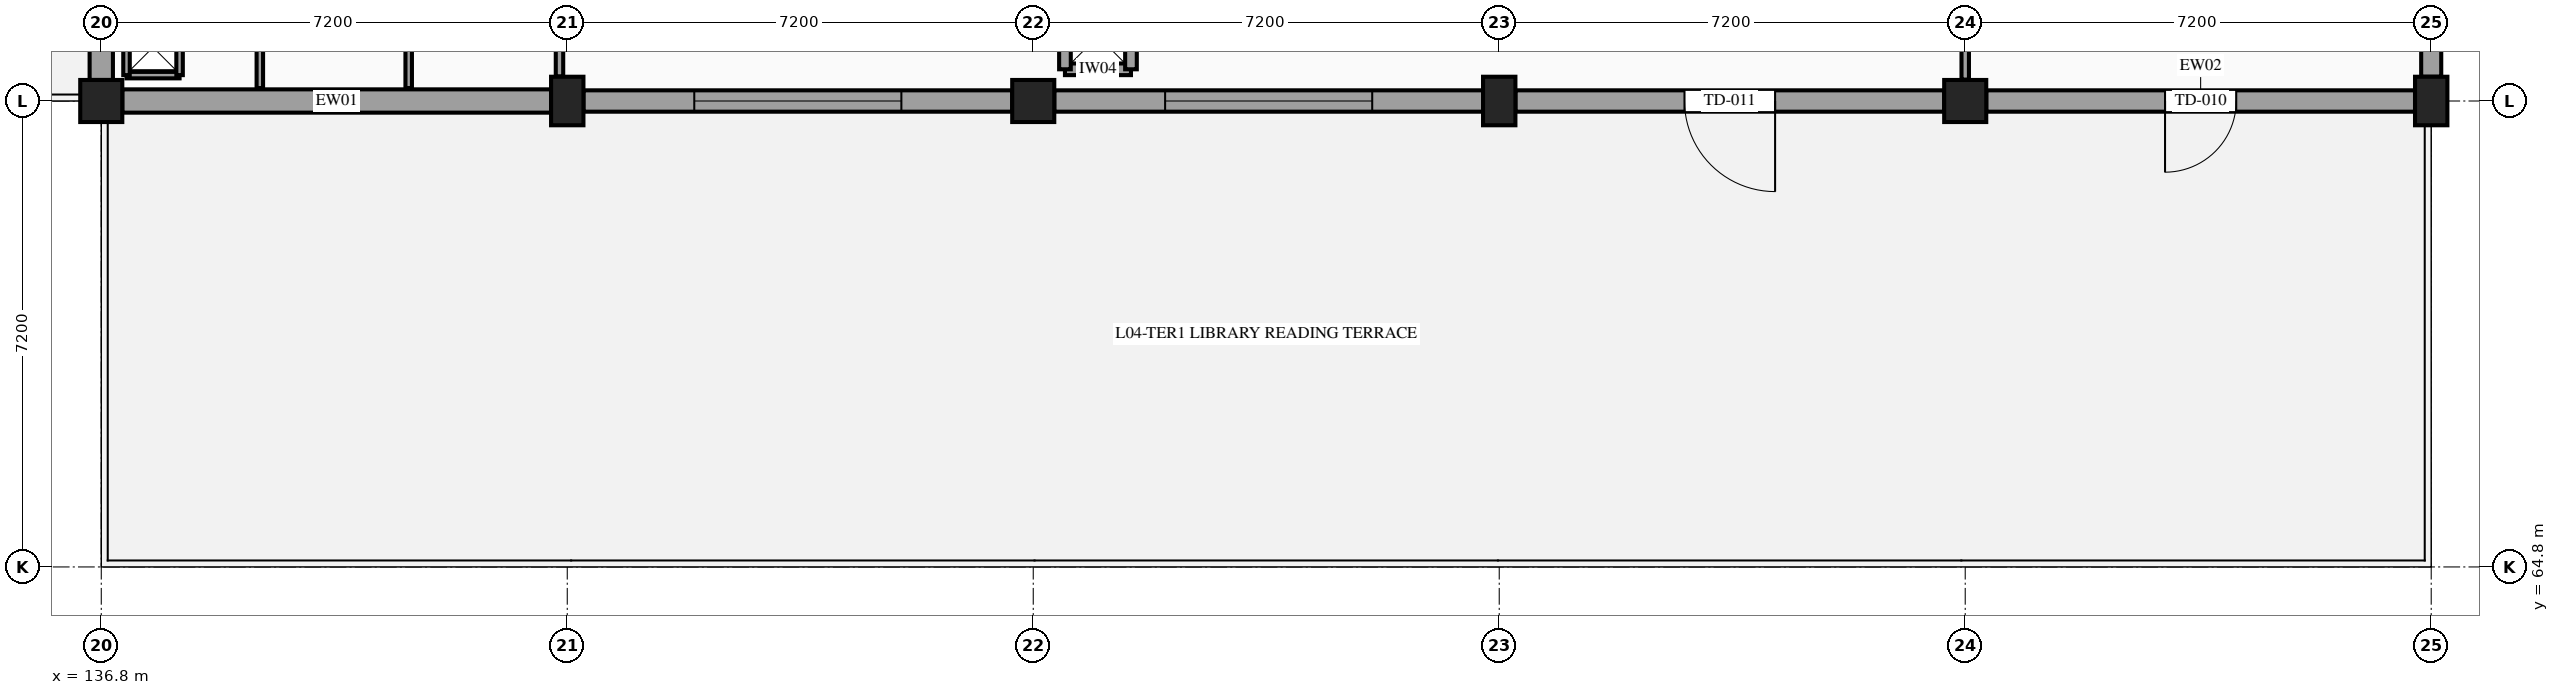
"""IFC4 building model, lengths in metres.
Left out: names, types, materials, properties, quantities, classifications, styles, units other than length and angle.
Written with IfcOpenShell. Run it as: python <this file> out.ifc"""

import sys

from ifc_helpers import new_model, si_unit, direction, frame, frame_2d, origin, origin_2d, place, context, subcontext, project, spatial, rectangle, extrude, element, fill, save


model = new_model("IFC4")
c1 = context("Model", 3, precision=1e-05, world=origin(), true_north=direction((0.0, 1.0)))
c2 = subcontext(c1, "Body", "Model", "MODEL_VIEW")
j1 = project(units=[si_unit("LENGTHUNIT", "METRE"), si_unit("PLANEANGLEUNIT", "RADIAN")], contexts=[c1])
p1 = place(None, origin())
s1 = spatial("IfcSite", under=j1, at=p1, CompositionType="ELEMENT")
p2 = place(p1, origin())
s2 = spatial("IfcBuilding", under=s1, at=p2, CompositionType="ELEMENT")
p3 = place(p2, frame((0.0, 0.0, 18.6)))
s3 = spatial("IfcBuildingStorey", under=s2, at=p3, CompositionType="ELEMENT", Elevation=18.6)
p4 = place(p3, frame((136.8, 72.0, 0.0), z_axis=(0.0, 0.0, 1.0), x_axis=(1.0, 0.0, 0.0)))
e1 = element("IfcColumn", 1, at=p4, inside=s3, PredefinedType="COLUMN", context=c2, shape_type="SweptSolid", body=[
    extrude(rectangle(XDim=0.65, YDim=0.65, at=origin_2d()), origin(), (0.0, 0.0, 1.0), 4.2),
])
p5 = place(p3, frame((144.0, 72.0, 0.0), z_axis=(0.0, 0.0, 1.0), x_axis=(1.0, 0.0, 0.0)))
e2 = element("IfcColumn", 2, at=p5, inside=s3, PredefinedType="COLUMN", context=c2, shape_type="SweptSolid", body=[
    extrude(rectangle(XDim=0.5, YDim=0.75, at=origin_2d()), origin(), (0.0, 0.0, 1.0), 4.2),
])
p6 = place(p3, frame((151.2, 72.0, 0.0), z_axis=(0.0, 0.0, 1.0), x_axis=(1.0, 0.0, 0.0)))
e3 = element("IfcColumn", 3, at=p6, inside=s3, PredefinedType="COLUMN", context=c2, shape_type="SweptSolid", body=[
    extrude(rectangle(XDim=0.65, YDim=0.65, at=origin_2d()), origin(), (0.0, 0.0, 1.0), 4.2),
])
p7 = place(p3, frame((158.4, 72.0, 0.0), z_axis=(0.0, 0.0, 1.0), x_axis=(1.0, 0.0, 0.0)))
e4 = element("IfcColumn", 4, at=p7, inside=s3, PredefinedType="COLUMN", context=c2, shape_type="SweptSolid", body=[
    extrude(rectangle(XDim=0.5, YDim=0.75, at=origin_2d()), origin(), (0.0, 0.0, 1.0), 4.2),
])
p8 = place(p3, frame((165.6, 72.0, 0.0), z_axis=(0.0, 0.0, 1.0), x_axis=(1.0, 0.0, 0.0)))
e5 = element("IfcColumn", 5, at=p8, inside=s3, PredefinedType="COLUMN", context=c2, shape_type="SweptSolid", body=[
    extrude(rectangle(XDim=0.65, YDim=0.65, at=origin_2d()), origin(), (0.0, 0.0, 1.0), 4.2),
])
p9 = place(p3, frame((172.8, 72.0, 0.0), z_axis=(0.0, 0.0, 1.0), x_axis=(1.0, 0.0, 0.0)))
e6 = element("IfcColumn", 6, at=p9, inside=s3, PredefinedType="COLUMN", context=c2, shape_type="SweptSolid", body=[
    extrude(rectangle(XDim=0.5, YDim=0.75, at=origin_2d()), origin(), (0.0, 0.0, 1.0), 4.2),
])
p10 = place(p3, frame((172.8, 78.88, 0.0), z_axis=(0.0, 0.0, 1.0), x_axis=(0.0, -1.0, 0.0)))
e7 = element("IfcWall", 7, at=p10, inside=s3, PredefinedType="STANDARD", context=c2, shape_type="SweptSolid", body=[
    extrude(rectangle(XDim=6.505, YDim=0.31, at=frame_2d((3.252, 0.0))), origin(), (0.0, 0.0, 1.0), 3.16),
])
p11 = place(p10, frame((2.002, 0.0, 0.98)))
e8 = element("IfcOpeningElement", 8, at=p11, cuts=e7, PredefinedType="OPENING", context=c2, shape_type="SweptSolid", body=[
    extrude(rectangle(XDim=2.5, YDim=1.35, at=frame_2d((1.25, 0.675))), frame((0.0, 0.165, 0.0), z_axis=(0.0, -1.0, 0.0), x_axis=(1.0, 0.0, 0.0)), (0.0, 0.0, 1.0), 0.33),
])
p12 = place(p3, frame((172.55, 72.0, 0.0), z_axis=(0.0, 0.0, 1.0), x_axis=(-1.0, 0.0, 0.0)))
e9 = element("IfcWall", 9, at=p12, inside=s3, PredefinedType="STANDARD", context=c2, shape_type="SweptSolid", body=[
    extrude(rectangle(XDim=6.625, YDim=0.33, at=frame_2d((3.312, 0.0))), origin(), (0.0, 0.0, 1.0), 3.21),
])
p13 = place(p12, frame((2.762, 0.0, 0.0)))
e10 = element("IfcOpeningElement", 10, at=p13, cuts=e9, PredefinedType="OPENING", context=c2, shape_type="SweptSolid", body=[
    extrude(rectangle(XDim=1.1, YDim=2.2, at=frame_2d((0.55, 1.1))), frame((0.0, 0.175, 0.0), z_axis=(0.0, -1.0, 0.0), x_axis=(1.0, 0.0, 0.0)), (0.0, 0.0, 1.0), 0.35),
])
p14 = place(p3, frame((165.275, 72.0, 0.0), z_axis=(0.0, 0.0, 1.0), x_axis=(-1.0, 0.0, 0.0)))
e11 = element("IfcWall", 11, at=p14, inside=s3, PredefinedType="STANDARD", context=c2, shape_type="SweptSolid", body=[
    extrude(rectangle(XDim=6.625, YDim=0.33, at=frame_2d((3.312, 0.0))), origin(), (0.0, 0.0, 1.0), 3.21),
])
p15 = place(p14, frame((2.613, 0.0, 0.0)))
e12 = element("IfcOpeningElement", 12, at=p15, cuts=e11, PredefinedType="OPENING", context=c2, shape_type="SweptSolid", body=[
    extrude(rectangle(XDim=1.4, YDim=2.25, at=frame_2d((0.7, 1.125))), frame((0.0, 0.175, 0.0), z_axis=(0.0, -1.0, 0.0), x_axis=(1.0, 0.0, 0.0)), (0.0, 0.0, 1.0), 0.35),
])
p16 = place(p3, frame((158.15, 72.0, 0.0), z_axis=(0.0, 0.0, 1.0), x_axis=(-1.0, 0.0, 0.0)))
e13 = element("IfcWall", 13, at=p16, inside=s3, PredefinedType="STANDARD", context=c2, shape_type="SweptSolid", body=[
    extrude(rectangle(XDim=6.625, YDim=0.33, at=frame_2d((3.312, 0.0))), origin(), (0.0, 0.0, 1.0), 3.21),
])
p17 = place(p16, frame((1.712, 0.0, 0.95)))
e14 = element("IfcOpeningElement", 14, at=p17, cuts=e13, PredefinedType="OPENING", context=c2, shape_type="SweptSolid", body=[
    extrude(rectangle(XDim=3.2, YDim=1.45, at=frame_2d((1.6, 0.725))), frame((0.0, 0.175, 0.0), z_axis=(0.0, -1.0, 0.0), x_axis=(1.0, 0.0, 0.0)), (0.0, 0.0, 1.0), 0.35),
])
p18 = place(p3, frame((150.875, 72.0, 0.0), z_axis=(0.0, 0.0, 1.0), x_axis=(-1.0, 0.0, 0.0)))
e15 = element("IfcWall", 15, at=p18, inside=s3, PredefinedType="STANDARD", context=c2, shape_type="SweptSolid", body=[
    extrude(rectangle(XDim=6.625, YDim=0.33, at=frame_2d((3.312, 0.0))), origin(), (0.0, 0.0, 1.0), 3.21),
])
p19 = place(p18, frame((1.712, 0.0, 0.95)))
e16 = element("IfcOpeningElement", 16, at=p19, cuts=e15, PredefinedType="OPENING", context=c2, shape_type="SweptSolid", body=[
    extrude(rectangle(XDim=3.2, YDim=1.45, at=frame_2d((1.6, 0.725))), frame((0.0, 0.175, 0.0), z_axis=(0.0, -1.0, 0.0), x_axis=(1.0, 0.0, 0.0)), (0.0, 0.0, 1.0), 0.35),
])
p20 = place(p3, frame((143.75, 72.0, 0.0), z_axis=(0.0, 0.0, 1.0), x_axis=(-1.0, 0.0, 0.0)))
e17 = element("IfcWall", 17, at=p20, inside=s3, PredefinedType="STANDARD", context=c2, shape_type="SweptSolid", body=[
    extrude(rectangle(XDim=6.625, YDim=0.36, at=frame_2d((3.312, 0.0))), origin(), (0.0, 0.0, 1.0), 3.21),
])
p21 = place(p3, frame((136.8, 72.325, 0.0), z_axis=(0.0, 0.0, 1.0), x_axis=(0.0, 1.0, 0.0)))
e18 = element("IfcWall", 18, at=p21, inside=s3, PredefinedType="STANDARD", context=c2, shape_type="SweptSolid", body=[
    extrude(rectangle(XDim=6.565, YDim=0.36, at=frame_2d((3.282, 0.0))), origin(), (0.0, 0.0, 1.0), 3.16),
])
p22 = place(p3, frame((143.88, 72.38, 0.0), z_axis=(0.0, 0.0, 1.0), x_axis=(0.0, 1.0, 0.0)))
e19 = element("IfcWall", 19, at=p22, inside=s3, PredefinedType="PARTITIONING", context=c2, shape_type="SweptSolid", body=[
    extrude(rectangle(XDim=6.495, YDim=0.115, at=frame_2d((3.248, 0.0))), origin(), (0.0, 0.0, 1.0), 3.33),
])
for number, where, z_axis, x_axis in (
    (20, (139.25, 72.2, 0.0), (0.0, 0.0, 1.0), (0.0, 1.0, 0.0)),
    (21, (141.55, 72.2, 0.0), (0.0, 0.0, 1.0), (0.0, 1.0, 0.0)),
):
    element("IfcWall", number, at=place(p3, frame(where, z_axis=z_axis, x_axis=x_axis)), inside=s3, PredefinedType="PARTITIONING", context=c2, shape_type="SweptSolid", body=[
        extrude(rectangle(XDim=6.8, YDim=0.1, at=frame_2d((3.4, 0.0))), origin(), (0.0, 0.0, 1.0), 3.955),
    ])
for number, where, z_axis, x_axis in (
    (22, (151.69, 72.49, 0.0), (0.0, 0.0, 1.0), (1.0, 0.0, 0.0)),
    (23, (152.71, 72.49, 0.0), (0.0, 0.0, 1.0), (0.0, 1.0, 0.0)),
    (24, (151.69, 73.51, 0.0), (0.0, 0.0, 1.0), (0.0, -1.0, 0.0)),
):
    element("IfcWall", number, at=place(p3, frame(where, z_axis=z_axis, x_axis=x_axis)), inside=s3, PredefinedType="PARTITIONING", context=c2, shape_type="SweptSolid", body=[
        extrude(rectangle(XDim=1.02, YDim=0.18, at=frame_2d((0.51, 0.0))), origin(), (0.0, 0.0, 1.0), 3.955),
    ])
p23 = place(p3, frame((137.19, 72.4, 0.0), z_axis=(0.0, 0.0, 1.0), x_axis=(1.0, 0.0, 0.0)))
e25 = element("IfcWall", 25, at=p23, inside=s3, PredefinedType="PARTITIONING", context=c2, shape_type="SweptSolid", body=[
    extrude(rectangle(XDim=0.82, YDim=0.1, at=frame_2d((0.41, 0.0))), origin(), (0.0, 0.0, 1.0), 3.955),
])
for number, where, z_axis, x_axis in (
    (26, (138.01, 72.4, 0.0), (0.0, 0.0, 1.0), (0.0, 1.0, 0.0)),
    (27, (137.19, 73.26, 0.0), (0.0, 0.0, 1.0), (0.0, -1.0, 0.0)),
):
    element("IfcWall", number, at=place(p3, frame(where, z_axis=z_axis, x_axis=x_axis)), inside=s3, PredefinedType="PARTITIONING", context=c2, shape_type="SweptSolid", body=[
        extrude(rectangle(XDim=0.86, YDim=0.1, at=frame_2d((0.43, 0.0))), origin(), (0.0, 0.0, 1.0), 3.955),
    ])
p24 = place(p3, frame((165.6, 72.33, 0.0), z_axis=(0.0, 0.0, 1.0), x_axis=(0.0, 1.0, 0.0)))
e28 = element("IfcWall", 28, at=p24, inside=s3, PredefinedType="PARTITIONING", context=c2, shape_type="SweptSolid", body=[
    extrude(rectangle(XDim=6.555, YDim=0.115, at=frame_2d((3.277, 0.0))), origin(), (0.0, 0.0, 1.0), 3.33),
])
p25 = place(p24, frame((2.587, 0.0, 0.0)))
e29 = element("IfcOpeningElement", 29, at=p25, cuts=e28, PredefinedType="OPENING", context=c2, shape_type="SweptSolid", body=[
    extrude(rectangle(XDim=1.38, YDim=2.22, at=frame_2d((0.69, 1.11))), frame((0.0, 0.067, 0.0), z_axis=(0.0, -1.0, 0.0), x_axis=(1.0, 0.0, 0.0)), (0.0, 0.0, 1.0), 0.135),
])
p26 = place(p13, origin())
e30 = element("IfcDoor", 30, at=p26, inside=s3, OperationType="SINGLE_SWING_RIGHT", PredefinedType="DOOR", context=c2, shape_type="SweptSolid", body=[
    extrude(rectangle(XDim=1.1, YDim=2.2, at=frame_2d((0.55, 1.1))), frame((0.0, 0.025, 0.0), z_axis=(0.0, -1.0, 0.0), x_axis=(1.0, 0.0, 0.0)), (0.0, 0.0, 1.0), 0.05),
])
fill(e10, e30)
p27 = place(p15, origin())
e31 = element("IfcDoor", 31, at=p27, inside=s3, OperationType="SINGLE_SWING_LEFT", PredefinedType="DOOR", context=c2, shape_type="SweptSolid", body=[
    extrude(rectangle(XDim=1.4, YDim=2.25, at=frame_2d((0.7, 1.125))), frame((0.0, 0.025, 0.0), z_axis=(0.0, -1.0, 0.0), x_axis=(1.0, 0.0, 0.0)), (0.0, 0.0, 1.0), 0.05),
])
fill(e12, e31)
p28 = place(p17, origin())
e32 = element("IfcWindow", 32, at=p28, inside=s3, PartitioningType="SINGLE_PANEL", PredefinedType="WINDOW", context=c2, shape_type="SweptSolid", body=[
    extrude(rectangle(XDim=3.2, YDim=1.45, at=frame_2d((1.6, 0.725))), frame((0.0, 0.03, 0.0), z_axis=(0.0, -1.0, 0.0), x_axis=(1.0, 0.0, 0.0)), (0.0, 0.0, 1.0), 0.06),
])
fill(e14, e32)
p29 = place(p19, origin())
e33 = element("IfcWindow", 33, at=p29, inside=s3, PartitioningType="SINGLE_PANEL", PredefinedType="WINDOW", context=c2, shape_type="SweptSolid", body=[
    extrude(rectangle(XDim=3.2, YDim=1.45, at=frame_2d((1.6, 0.725))), frame((0.0, 0.03, 0.0), z_axis=(0.0, -1.0, 0.0), x_axis=(1.0, 0.0, 0.0)), (0.0, 0.0, 1.0), 0.06),
])
fill(e16, e33)
save(model, sys.argv[1])
